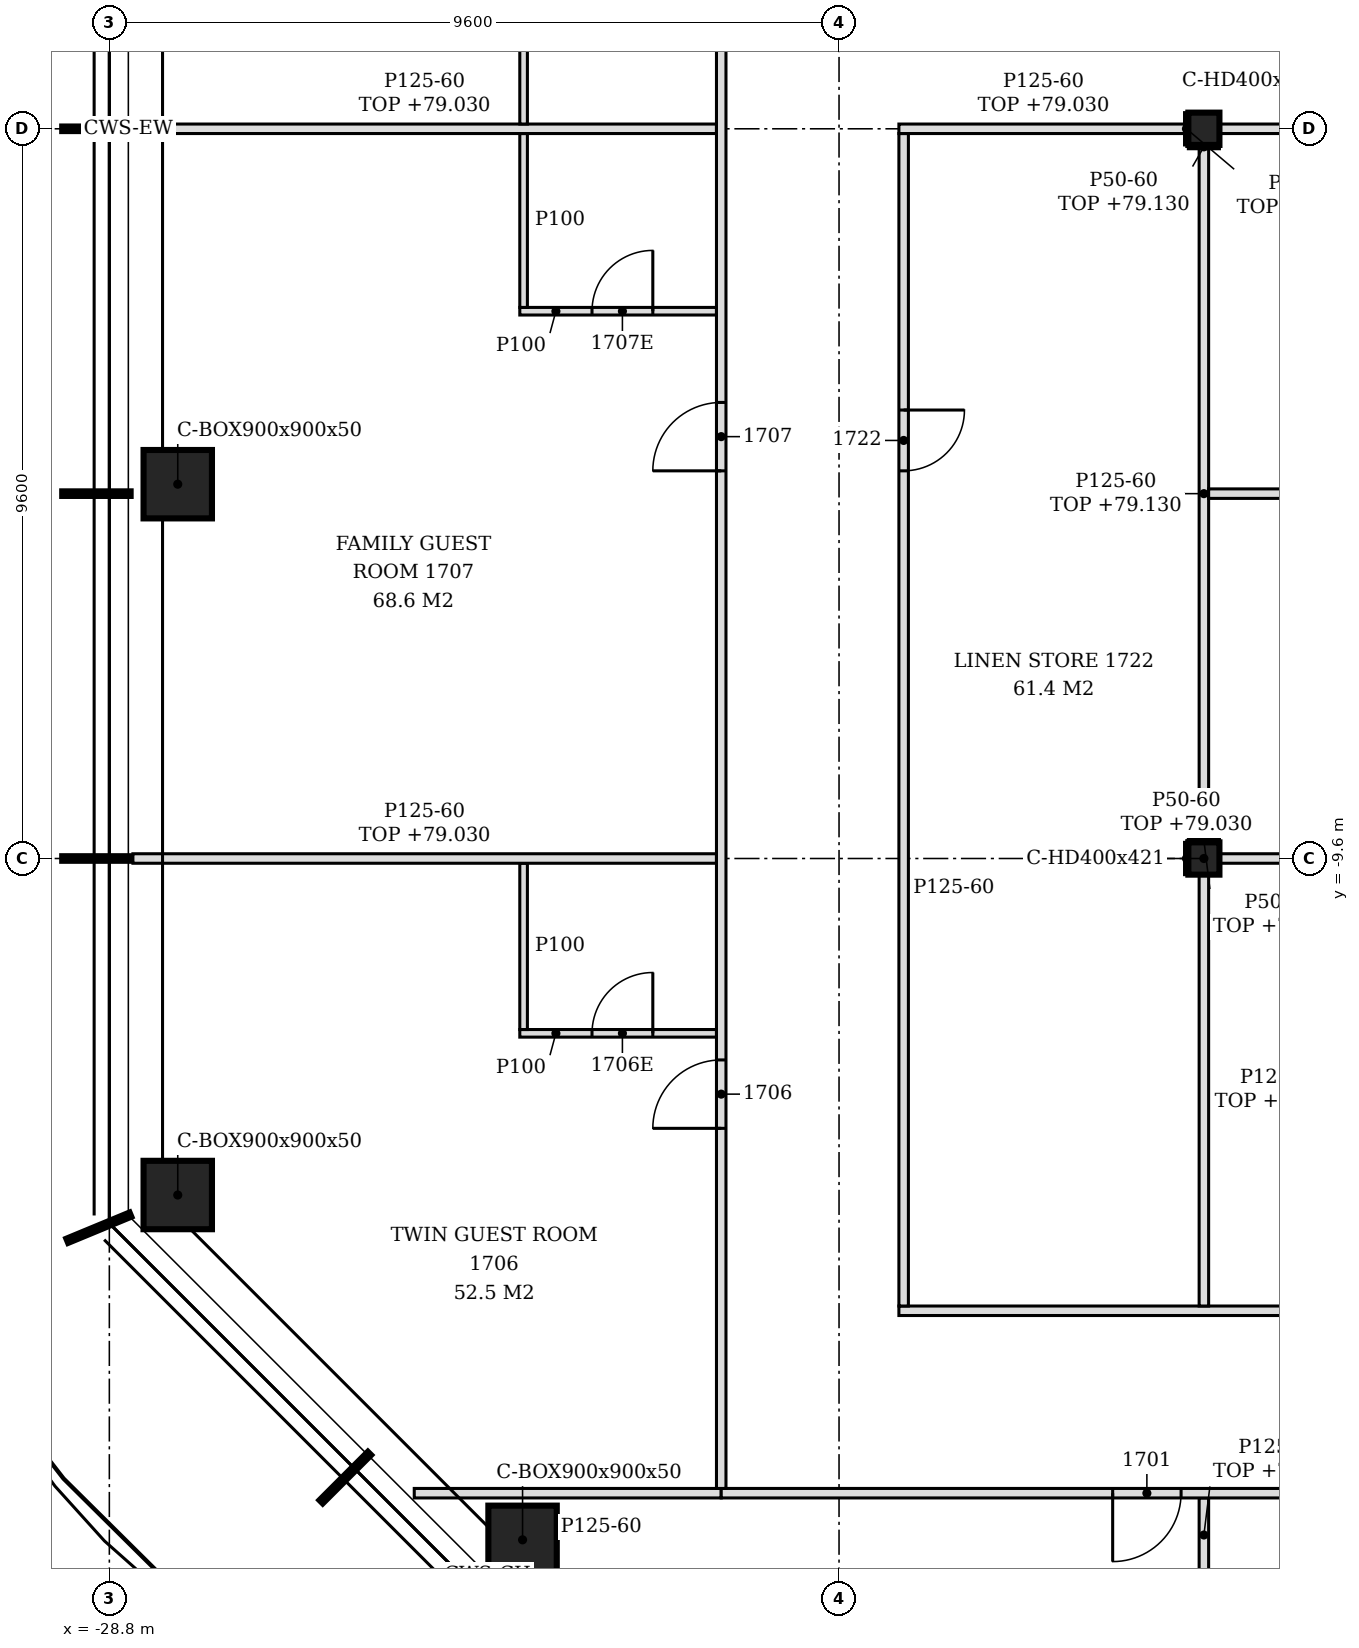
"""IFC4 building model, lengths in metres.
Left out: names, types, materials, properties, quantities, classifications, styles, units other than length and angle.
Written with IfcOpenShell. Run it as: python <this file> out.ifc"""

import sys

from ifc_helpers import new_model, si_unit, direction, frame, frame_2d, origin, origin_2d, place, context, subcontext, project, spatial, polyline, rectangle, hollow_rectangle, i_section, outline, extrude, element, fill, save


model = new_model("IFC4")
c1 = context("Model", 3, precision=1e-05, world=origin(), true_north=direction((0.0, 1.0)))
c2 = subcontext(c1, "Body", "Model", "MODEL_VIEW")
j1 = project(units=[si_unit("LENGTHUNIT", "METRE"), si_unit("PLANEANGLEUNIT", "RADIAN")], contexts=[c1])
p1 = place(None, origin())
s1 = spatial("IfcSite", under=j1, at=p1, CompositionType="ELEMENT")
p2 = place(p1, origin())
s2 = spatial("IfcBuilding", under=s1, at=p2, CompositionType="ELEMENT")
p3 = place(p2, frame((0.0, 0.0, 76.2)))
s3 = spatial("IfcBuildingStorey", under=s2, at=p3, CompositionType="ELEMENT", Elevation=76.2)
for number, where, z_axis, x_axis in (
    (1, (-27.9, -4.676, -0.15), (0.0, 0.0, 1.0), (1.0, 0.0, 0.0)),
    (2, (-27.9, -14.027, -0.15), (0.0, 0.0, 1.0), (1.0, 0.0, 0.0)),
    (3, (-23.364, -18.564, -0.15), (0.0, 0.0, 1.0), (1.0, 0.0, 0.0)),
):
    element("IfcColumn", number, at=place(p3, frame(where, z_axis=z_axis, x_axis=x_axis)), inside=s3, PredefinedType="COLUMN", context=c2, shape_type="SweptSolid", body=[
        extrude(hollow_rectangle(XDim=0.9, YDim=0.9, WallThickness=0.05, at=origin_2d()), origin(), (0.0, 0.0, 1.0), 3.6),
    ])
for number, where, z_axis, x_axis in (
    (4, (-14.4, -9.6, -0.15), (0.0, 0.0, 1.0), (1.0, 0.0, 0.0)),
    (5, (-14.4, 0.0, -0.15), (0.0, 0.0, 1.0), (1.0, 0.0, 0.0)),
):
    element("IfcColumn", number, at=place(p3, frame(where, z_axis=z_axis, x_axis=x_axis)), inside=s3, PredefinedType="COLUMN", context=c2, shape_type="SweptSolid", body=[
        extrude(i_section(OverallWidth=0.409, OverallDepth=0.425, WebThickness=0.033, FlangeThickness=0.052, FilletRadius=0.015, at=origin_2d()), origin(), (0.0, 0.0, 1.0), 3.6),
    ])
p4 = place(p3, frame((-14.4, -18.988, 0.0), z_axis=(0.0, 0.0, 1.0), x_axis=(0.0, 1.0, 0.0)))
e6 = element("IfcWall", 6, at=p4, inside=s3, PredefinedType="PARTITIONING", context=c2, shape_type="SweptSolid", body=[
    extrude(rectangle(XDim=0.975, YDim=0.125, at=frame_2d((0.488, 0.0))), origin(), (0.0, 0.0, 1.0), 2.93),
])
p5 = place(p3, frame((-24.789, -17.95, 0.0), z_axis=(0.0, 0.0, 1.0), x_axis=(1.0, 0.0, 0.0)))
e7 = element("IfcWall", 7, at=p5, inside=s3, PredefinedType="PARTITIONING", context=c2, shape_type="SweptSolid", body=[
    extrude(outline(polyline([(0.0, 0.0), (4.039, 0.0), (4.039, 3.45), (1.086, 3.45), (1.084, 2.93), (0.537, 2.93), (0.535, 3.45), (0.0, 3.45), (0.0, 0.0)])), frame((0.0, 0.062, 0.0), z_axis=(0.0, -1.0, 0.0), x_axis=(1.0, 0.0, 0.0)), (0.0, 0.0, 1.0), 0.125),
])
p6 = place(p3, frame((-20.75, -17.95, 0.0), z_axis=(0.0, 0.0, 1.0), x_axis=(1.0, 0.0, 0.0)))
e8 = element("IfcWall", 8, at=p6, inside=s3, PredefinedType="PARTITIONING", context=c2, shape_type="SweptSolid", body=[
    extrude(outline(polyline([(0.0, 0.0), (39.887, 0.0), (39.887, 2.73), (39.8, 2.73), (39.798, 3.45), (28.1, 3.45), (28.098, 2.73), (27.8, 2.73), (27.798, 3.45), (16.1, 3.45), (16.098, 2.73), (15.8, 2.73), (15.798, 3.45), (6.5, 3.45), (6.498, 2.93), (6.2, 2.93), (6.198, 3.45), (0.0, 3.45), (0.0, 0.0)])), frame((0.0, 0.062, 0.0), z_axis=(0.0, -1.0, 0.0), x_axis=(1.0, 0.0, 0.0)), (0.0, 0.0, 1.0), 0.125),
])
p7 = place(p6, frame((5.15, 0.0, 0.0)))
e9 = element("IfcOpeningElement", 9, at=p7, cuts=e8, PredefinedType="OPENING", context=c2, shape_type="SweptSolid", body=[
    extrude(rectangle(XDim=0.9, YDim=2.1, at=frame_2d((0.45, 1.05))), frame((0.0, 0.073, 0.0), z_axis=(0.0, -1.0, 0.0), x_axis=(1.0, 0.0, 0.0)), (0.0, 0.0, 1.0), 0.145),
])
p8 = place(p6, frame((14.75, 0.0, 0.0)))
e10 = element("IfcOpeningElement", 10, at=p8, cuts=e8, PredefinedType="OPENING", context=c2, shape_type="SweptSolid", body=[
    extrude(rectangle(XDim=0.9, YDim=2.1, at=frame_2d((0.45, 1.05))), frame((0.0, 0.073, 0.0), z_axis=(0.0, -1.0, 0.0), x_axis=(1.0, 0.0, 0.0)), (0.0, 0.0, 1.0), 0.145),
])
p9 = place(p6, frame((24.35, 0.0, 0.0)))
e11 = element("IfcOpeningElement", 11, at=p9, cuts=e8, PredefinedType="OPENING", context=c2, shape_type="SweptSolid", body=[
    extrude(rectangle(XDim=0.9, YDim=2.1, at=frame_2d((0.45, 1.05))), frame((0.0, 0.073, 0.0), z_axis=(0.0, -1.0, 0.0), x_axis=(1.0, 0.0, 0.0)), (0.0, 0.0, 1.0), 0.145),
])
p10 = place(p6, frame((29.75, 0.0, 0.0)))
e12 = element("IfcOpeningElement", 12, at=p10, cuts=e8, PredefinedType="OPENING", context=c2, shape_type="SweptSolid", body=[
    extrude(rectangle(XDim=0.9, YDim=2.1, at=frame_2d((0.45, 1.05))), frame((0.0, 0.073, 0.0), z_axis=(0.0, -1.0, 0.0), x_axis=(1.0, 0.0, 0.0)), (0.0, 0.0, 1.0), 0.145),
])
p11 = place(p6, frame((35.45, 0.0, 0.0)))
e13 = element("IfcOpeningElement", 13, at=p11, cuts=e8, PredefinedType="OPENING", context=c2, shape_type="SweptSolid", body=[
    extrude(rectangle(XDim=0.9, YDim=2.1, at=frame_2d((0.45, 1.05))), frame((0.0, 0.073, 0.0), z_axis=(0.0, -1.0, 0.0), x_axis=(1.0, 0.0, 0.0)), (0.0, 0.0, 1.0), 0.145),
])
p12 = place(p3, frame((-20.75, -17.887, 0.0), z_axis=(0.0, 0.0, 1.0), x_axis=(0.0, 1.0, 0.0)))
e14 = element("IfcWall", 14, at=p12, inside=s3, PredefinedType="PARTITIONING", context=c2, shape_type="SweptSolid", body=[
    extrude(outline(polyline([(0.0, 0.0), (39.876, 0.0), (39.876, 3.45), (39.622, 3.45), (39.62, 2.63), (38.507, 2.63), (38.505, 3.45), (37.183, 3.45), (37.18, 2.98), (36.992, 2.98), (36.99, 3.45), (32.397, 3.45), (32.396, 2.83), (32.177, 2.83), (32.176, 3.45), (27.597, 3.45), (27.595, 2.83), (27.377, 2.83), (27.375, 3.45), (22.798, 3.45), (22.795, 2.83), (22.577, 2.83), (22.575, 3.45), (17.998, 3.45), (17.996, 2.83), (17.778, 2.83), (17.775, 3.45), (13.198, 3.45), (13.196, 2.83), (12.978, 2.83), (12.976, 3.45), (8.397, 3.45), (8.396, 2.83), (8.177, 2.83), (8.176, 3.45), (3.597, 3.45), (3.595, 2.83), (3.377, 2.83), (3.375, 3.45), (0.0, 3.45), (0.0, 0.0)])), frame((0.0, 0.062, 0.0), z_axis=(0.0, -1.0, 0.0), x_axis=(1.0, 0.0, 0.0)), (0.0, 0.0, 1.0), 0.125),
])
p13 = place(p12, frame((4.738, 0.0, 0.0)))
e15 = element("IfcOpeningElement", 15, at=p13, cuts=e14, PredefinedType="OPENING", context=c2, shape_type="SweptSolid", body=[
    extrude(rectangle(XDim=0.9, YDim=2.1, at=frame_2d((0.45, 1.05))), frame((0.0, 0.073, 0.0), z_axis=(0.0, -1.0, 0.0), x_axis=(1.0, 0.0, 0.0)), (0.0, 0.0, 1.0), 0.145),
])
p14 = place(p12, frame((13.387, 0.0, 0.0)))
e16 = element("IfcOpeningElement", 16, at=p14, cuts=e14, PredefinedType="OPENING", context=c2, shape_type="SweptSolid", body=[
    extrude(rectangle(XDim=0.9, YDim=2.1, at=frame_2d((0.45, 1.05))), frame((0.0, 0.073, 0.0), z_axis=(0.0, -1.0, 0.0), x_axis=(1.0, 0.0, 0.0)), (0.0, 0.0, 1.0), 0.145),
])
p15 = place(p12, frame((20.988, 0.0, 0.0)))
e17 = element("IfcOpeningElement", 17, at=p15, cuts=e14, PredefinedType="OPENING", context=c2, shape_type="SweptSolid", body=[
    extrude(rectangle(XDim=0.9, YDim=2.1, at=frame_2d((0.45, 1.05))), frame((0.0, 0.073, 0.0), z_axis=(0.0, -1.0, 0.0), x_axis=(1.0, 0.0, 0.0)), (0.0, 0.0, 1.0), 0.145),
])
p16 = place(p12, frame((31.387, 0.0, 0.0)))
e18 = element("IfcOpeningElement", 18, at=p16, cuts=e14, PredefinedType="OPENING", context=c2, shape_type="SweptSolid", body=[
    extrude(rectangle(XDim=0.9, YDim=2.1, at=frame_2d((0.45, 1.05))), frame((0.0, 0.073, 0.0), z_axis=(0.0, -1.0, 0.0), x_axis=(1.0, 0.0, 0.0)), (0.0, 0.0, 1.0), 0.145),
])
p17 = place(p3, frame((-18.413, -15.55, 0.0), z_axis=(0.0, 0.0, 1.0), x_axis=(1.0, 0.0, 0.0)))
e19 = element("IfcWall", 19, at=p17, inside=s3, PredefinedType="PARTITIONING", context=c2, shape_type="SweptSolid", body=[
    extrude(outline(polyline([(0.0, 0.0), (18.475, 0.0), (18.475, 3.45), (13.762, 3.45), (13.76, 2.73), (13.462, 2.73), (13.46, 3.45), (4.163, 3.45), (4.16, 2.93), (3.863, 2.93), (3.861, 3.45), (0.0, 3.45), (0.0, 0.0)])), frame((0.0, 0.062, 0.0), z_axis=(0.0, -1.0, 0.0), x_axis=(1.0, 0.0, 0.0)), (0.0, 0.0, 1.0), 0.125),
])
p18 = place(p17, frame((12.312, 0.0, 0.0)))
e20 = element("IfcOpeningElement", 20, at=p18, cuts=e19, PredefinedType="OPENING", context=c2, shape_type="SweptSolid", body=[
    extrude(rectangle(XDim=0.9, YDim=2.1, at=frame_2d((0.45, 1.05))), frame((0.0, 0.073, 0.0), z_axis=(0.0, -1.0, 0.0), x_axis=(1.0, 0.0, 0.0)), (0.0, 0.0, 1.0), 0.145),
])
p19 = place(p3, frame((-18.35, -15.488, 0.0), z_axis=(0.0, 0.0, 1.0), x_axis=(0.0, 1.0, 0.0)))
e21 = element("IfcWall", 21, at=p19, inside=s3, PredefinedType="PARTITIONING", context=c2, shape_type="SweptSolid", body=[
    extrude(outline(polyline([(0.0, 0.0), (15.425, 0.0), (15.425, 2.83), (15.377, 2.83), (15.375, 3.45), (10.798, 3.45), (10.795, 2.83), (10.577, 2.83), (10.575, 3.45), (5.998, 3.45), (5.996, 2.83), (5.778, 2.83), (5.775, 3.45), (1.198, 3.45), (1.196, 2.83), (0.978, 2.83), (0.976, 3.45), (0.0, 3.45), (0.0, 0.0)])), frame((0.0, 0.062, 0.0), z_axis=(0.0, -1.0, 0.0), x_axis=(1.0, 0.0, 0.0)), (0.0, 0.0, 1.0), 0.125),
])
p20 = place(p19, frame((10.988, 0.0, 0.0)))
e22 = element("IfcOpeningElement", 22, at=p20, cuts=e21, PredefinedType="OPENING", context=c2, shape_type="SweptSolid", body=[
    extrude(rectangle(XDim=0.8, YDim=2.1, at=frame_2d((0.4, 1.05))), frame((0.0, 0.073, 0.0), z_axis=(0.0, -1.0, 0.0), x_axis=(1.0, 0.0, 0.0)), (0.0, 0.0, 1.0), 0.145),
])
p21 = place(p3, frame((-14.4, -15.488, 0.0), z_axis=(0.0, 0.0, 1.0), x_axis=(0.0, 1.0, 0.0)))
e23 = element("IfcWall", 23, at=p21, inside=s3, PredefinedType="PARTITIONING", context=c2, shape_type="SweptSolid", body=[
    extrude(rectangle(XDim=5.675, YDim=0.125, at=frame_2d((2.837, 0.0))), origin(), (0.0, 0.0, 1.0), 2.93),
])
p22 = place(p3, frame((-23.4, -11.9, 0.0), z_axis=(0.0, 0.0, 1.0), x_axis=(1.0, 0.0, 0.0)))
e24 = element("IfcWall", 24, at=p22, inside=s3, PredefinedType="PARTITIONING", context=c2, shape_type="SweptSolid", body=[
    extrude(rectangle(XDim=2.587, YDim=0.1, at=frame_2d((1.294, 0.0))), origin(), (0.0, 0.0, 1.0), 3.45),
])
p23 = place(p22, frame((0.95, 0.0, 0.0)))
e25 = element("IfcOpeningElement", 25, at=p23, cuts=e24, PredefinedType="OPENING", context=c2, shape_type="SweptSolid", body=[
    extrude(rectangle(XDim=0.8, YDim=2.1, at=frame_2d((0.4, 1.05))), frame((0.0, 0.06, 0.0), z_axis=(0.0, -1.0, 0.0), x_axis=(1.0, 0.0, 0.0)), (0.0, 0.0, 1.0), 0.12),
])
p24 = place(p3, frame((-23.35, -11.85, 0.0), z_axis=(0.0, 0.0, 1.0), x_axis=(0.0, 1.0, 0.0)))
e26 = element("IfcWall", 26, at=p24, inside=s3, PredefinedType="PARTITIONING", context=c2, shape_type="SweptSolid", body=[
    extrude(outline(polyline([(0.0, 0.0), (2.188, 0.0), (2.188, 2.83), (2.14, 2.83), (2.138, 3.45), (0.0, 3.45), (0.0, 0.0)])), frame((0.0, 0.05, 0.0), z_axis=(0.0, -1.0, 0.0), x_axis=(1.0, 0.0, 0.0)), (0.0, 0.0, 1.0), 0.1),
])
p25 = place(p3, frame((-28.49, -9.6, 0.0), z_axis=(0.0, 0.0, 1.0), x_axis=(1.0, 0.0, 0.0)))
e27 = element("IfcWall", 27, at=p25, inside=s3, PredefinedType="PARTITIONING", context=c2, shape_type="SweptSolid", body=[
    extrude(rectangle(XDim=7.677, YDim=0.125, at=frame_2d((3.839, 0.0))), origin(), (0.0, 0.0, 1.0), 2.83),
])
p26 = place(p3, frame((-14.196, -9.6, 0.0), z_axis=(0.0, 0.0, 1.0), x_axis=(1.0, 0.0, 0.0)))
e28 = element("IfcWall", 28, at=p26, inside=s3, PredefinedType="PARTITIONING", context=c2, shape_type="SweptSolid", body=[
    extrude(outline(polyline([(0.0, 0.0), (9.333, 0.0), (9.333, 2.73), (9.246, 2.73), (9.243, 2.93), (0.0, 2.93), (0.0, 0.0)])), frame((0.0, 0.062, 0.0), z_axis=(0.0, -1.0, 0.0), x_axis=(1.0, 0.0, 0.0)), (0.0, 0.0, 1.0), 0.125),
])
p27 = place(p3, frame((-14.4, -9.387, 0.0), z_axis=(0.0, 0.0, 1.0), x_axis=(0.0, 1.0, 0.0)))
e29 = element("IfcWall", 29, at=p27, inside=s3, PredefinedType="PARTITIONING", context=c2, shape_type="SweptSolid", body=[
    extrude(rectangle(XDim=9.175, YDim=0.125, at=frame_2d((4.587, 0.0))), origin(), (0.0, 0.0, 1.0), 2.93),
])
p28 = place(p3, frame((-14.337, -4.8, 0.0), z_axis=(0.0, 0.0, 1.0), x_axis=(1.0, 0.0, 0.0)))
e30 = element("IfcWall", 30, at=p28, inside=s3, PredefinedType="PARTITIONING", context=c2, shape_type="SweptSolid", body=[
    extrude(outline(polyline([(0.0, 0.0), (9.475, 0.0), (9.475, 2.83), (9.387, 2.83), (9.385, 2.93), (0.0, 2.93), (0.0, 0.0)])), frame((0.0, 0.062, 0.0), z_axis=(0.0, -1.0, 0.0), x_axis=(1.0, 0.0, 0.0)), (0.0, 0.0, 1.0), 0.125),
])
p29 = place(p3, frame((-23.4, -2.4, 0.0), z_axis=(0.0, 0.0, 1.0), x_axis=(1.0, 0.0, 0.0)))
e31 = element("IfcWall", 31, at=p29, inside=s3, PredefinedType="PARTITIONING", context=c2, shape_type="SweptSolid", body=[
    extrude(rectangle(XDim=2.587, YDim=0.1, at=frame_2d((1.294, 0.0))), origin(), (0.0, 0.0, 1.0), 3.45),
])
p30 = place(p29, frame((0.95, 0.0, 0.0)))
e32 = element("IfcOpeningElement", 32, at=p30, cuts=e31, PredefinedType="OPENING", context=c2, shape_type="SweptSolid", body=[
    extrude(rectangle(XDim=0.8, YDim=2.1, at=frame_2d((0.4, 1.05))), frame((0.0, 0.06, 0.0), z_axis=(0.0, -1.0, 0.0), x_axis=(1.0, 0.0, 0.0)), (0.0, 0.0, 1.0), 0.12),
])
p31 = place(p3, frame((-23.35, -2.35, 0.0), z_axis=(0.0, 0.0, 1.0), x_axis=(0.0, 1.0, 0.0)))
e33 = element("IfcWall", 33, at=p31, inside=s3, PredefinedType="PARTITIONING", context=c2, shape_type="SweptSolid", body=[
    extrude(outline(polyline([(0.0, 0.0), (2.288, 0.0), (2.288, 2.83), (2.24, 2.83), (2.238, 3.45), (0.0, 3.45), (0.0, 0.0)])), frame((0.0, 0.05, 0.0), z_axis=(0.0, -1.0, 0.0), x_axis=(1.0, 0.0, 0.0)), (0.0, 0.0, 1.0), 0.1),
])
p32 = place(p3, frame((-28.49, 0.0, 0.0), z_axis=(0.0, 0.0, 1.0), x_axis=(1.0, 0.0, 0.0)))
e34 = element("IfcWall", 34, at=p32, inside=s3, PredefinedType="PARTITIONING", context=c2, shape_type="SweptSolid", body=[
    extrude(rectangle(XDim=7.677, YDim=0.125, at=frame_2d((3.839, 0.0))), origin(), (0.0, 0.0, 1.0), 2.83),
])
p33 = place(p3, frame((-18.413, 0.0, 0.0), z_axis=(0.0, 0.0, 1.0), x_axis=(1.0, 0.0, 0.0)))
e35 = element("IfcWall", 35, at=p33, inside=s3, PredefinedType="PARTITIONING", context=c2, shape_type="SweptSolid", body=[
    extrude(rectangle(XDim=3.808, YDim=0.125, at=frame_2d((1.904, 0.0))), origin(), (0.0, 0.0, 1.0), 2.83),
])
p34 = place(p3, frame((-14.196, 0.0, 0.0), z_axis=(0.0, 0.0, 1.0), x_axis=(1.0, 0.0, 0.0)))
e36 = element("IfcWall", 36, at=p34, inside=s3, PredefinedType="PARTITIONING", context=c2, shape_type="SweptSolid", body=[
    extrude(outline(polyline([(0.0, 0.0), (9.458, 0.0), (9.458, 2.83), (9.246, 2.83), (9.243, 2.93), (0.0, 2.93), (0.0, 0.0)])), frame((0.0, 0.062, 0.0), z_axis=(0.0, -1.0, 0.0), x_axis=(1.0, 0.0, 0.0)), (0.0, 0.0, 1.0), 0.125),
])
p35 = place(p34, frame((8.196, 0.0, 0.0)))
e37 = element("IfcOpeningElement", 37, at=p35, cuts=e36, PredefinedType="OPENING", context=c2, shape_type="SweptSolid", body=[
    extrude(rectangle(XDim=0.9, YDim=2.1, at=frame_2d((0.45, 1.05))), frame((0.0, 0.073, 0.0), z_axis=(0.0, -1.0, 0.0), x_axis=(1.0, 0.0, 0.0)), (0.0, 0.0, 1.0), 0.145),
])
p36 = place(p3, frame((-23.35, 0.062, 0.0), z_axis=(0.0, 0.0, 1.0), x_axis=(0.0, 1.0, 0.0)))
e38 = element("IfcWall", 38, at=p36, inside=s3, PredefinedType="PARTITIONING", context=c2, shape_type="SweptSolid", body=[
    extrude(outline(polyline([(0.0, 0.0), (2.188, 0.0), (2.188, 3.45), (0.048, 3.45), (0.045, 2.83), (0.0, 2.83), (0.0, 0.0)])), frame((0.0, 0.05, 0.0), z_axis=(0.0, -1.0, 0.0), x_axis=(1.0, 0.0, 0.0)), (0.0, 0.0, 1.0), 0.1),
])
p37 = place(p3, frame((-14.629, -9.812, 0.0), z_axis=(0.0, 0.0, 1.0), x_axis=(0.0, 1.0, 0.0)))
e39 = element("IfcWall", 39, at=p37, inside=s3, PredefinedType="PARTITIONING", context=c2, shape_type="SweptSolid", body=[
    extrude(rectangle(XDim=0.425, YDim=0.05, at=frame_2d((0.212, 0.0))), origin(), (0.0, 0.0, 1.0), 2.83),
])
p38 = place(p3, frame((-14.629, -0.212, 0.0), z_axis=(0.0, 0.0, 1.0), x_axis=(0.0, 1.0, 0.0)))
e40 = element("IfcWall", 40, at=p38, inside=s3, PredefinedType="PARTITIONING", context=c2, shape_type="SweptSolid", body=[
    extrude(rectangle(XDim=0.425, YDim=0.05, at=frame_2d((0.212, 0.0))), origin(), (0.0, 0.0, 1.0), 2.83),
])
for number, where, z_axis, x_axis in (
    (41, (-14.604, -9.363, 0.0), (0.0, 0.0, 1.0), (1.0, 0.0, 0.0)),
    (42, (-14.604, -0.238, 0.0), (0.0, 0.0, 1.0), (1.0, 0.0, 0.0)),
):
    element("IfcWall", number, at=place(p3, frame(where, z_axis=z_axis, x_axis=x_axis)), inside=s3, PredefinedType="PARTITIONING", context=c2, shape_type="SweptSolid", body=[
        extrude(rectangle(XDim=0.409, YDim=0.05, at=frame_2d((0.205, 0.0))), origin(), (0.0, 0.0, 1.0), 2.93),
    ])
p39 = place(p7, frame((0.9, 0.0, 0.0), z_axis=(0.0, 0.0, 1.0), x_axis=(-1.0, 0.0, 0.0)))
e43 = element("IfcDoor", 43, at=p39, inside=s3, OperationType="SINGLE_SWING_RIGHT", PredefinedType="DOOR", context=c2, shape_type="SweptSolid", body=[
    extrude(rectangle(XDim=0.9, YDim=2.1, at=frame_2d((0.45, 1.05))), frame((0.0, 0.025, 0.0), z_axis=(0.0, -1.0, 0.0), x_axis=(1.0, 0.0, 0.0)), (0.0, 0.0, 1.0), 0.05),
])
fill(e9, e43)
p40 = place(p13, origin())
e44 = element("IfcDoor", 44, at=p40, inside=s3, OperationType="SINGLE_SWING_LEFT", PredefinedType="DOOR", context=c2, shape_type="SweptSolid", body=[
    extrude(rectangle(XDim=0.9, YDim=2.1, at=frame_2d((0.45, 1.05))), frame((0.0, 0.025, 0.0), z_axis=(0.0, -1.0, 0.0), x_axis=(1.0, 0.0, 0.0)), (0.0, 0.0, 1.0), 0.05),
])
fill(e15, e44)
p41 = place(p23, origin())
e45 = element("IfcDoor", 45, at=p41, inside=s3, OperationType="SINGLE_SWING_RIGHT", PredefinedType="DOOR", context=c2, shape_type="SweptSolid", body=[
    extrude(rectangle(XDim=0.8, YDim=2.1, at=frame_2d((0.4, 1.05))), frame((0.0, 0.025, 0.0), z_axis=(0.0, -1.0, 0.0), x_axis=(1.0, 0.0, 0.0)), (0.0, 0.0, 1.0), 0.05),
])
fill(e25, e45)
p42 = place(p14, origin())
e46 = element("IfcDoor", 46, at=p42, inside=s3, OperationType="SINGLE_SWING_LEFT", PredefinedType="DOOR", context=c2, shape_type="SweptSolid", body=[
    extrude(rectangle(XDim=0.9, YDim=2.1, at=frame_2d((0.45, 1.05))), frame((0.0, 0.025, 0.0), z_axis=(0.0, -1.0, 0.0), x_axis=(1.0, 0.0, 0.0)), (0.0, 0.0, 1.0), 0.05),
])
fill(e16, e46)
p43 = place(p30, origin())
e47 = element("IfcDoor", 47, at=p43, inside=s3, OperationType="SINGLE_SWING_RIGHT", PredefinedType="DOOR", context=c2, shape_type="SweptSolid", body=[
    extrude(rectangle(XDim=0.8, YDim=2.1, at=frame_2d((0.4, 1.05))), frame((0.0, 0.025, 0.0), z_axis=(0.0, -1.0, 0.0), x_axis=(1.0, 0.0, 0.0)), (0.0, 0.0, 1.0), 0.05),
])
fill(e32, e47)
p44 = place(p20, frame((0.8, 0.0, 0.0), z_axis=(0.0, 0.0, 1.0), x_axis=(-1.0, 0.0, 0.0)))
e48 = element("IfcDoor", 48, at=p44, inside=s3, OperationType="SINGLE_SWING_LEFT", PredefinedType="DOOR", context=c2, shape_type="SweptSolid", body=[
    extrude(rectangle(XDim=0.8, YDim=2.1, at=frame_2d((0.4, 1.05))), frame((0.0, 0.025, 0.0), z_axis=(0.0, -1.0, 0.0), x_axis=(1.0, 0.0, 0.0)), (0.0, 0.0, 1.0), 0.05),
])
fill(e22, e48)
save(model, sys.argv[1])
